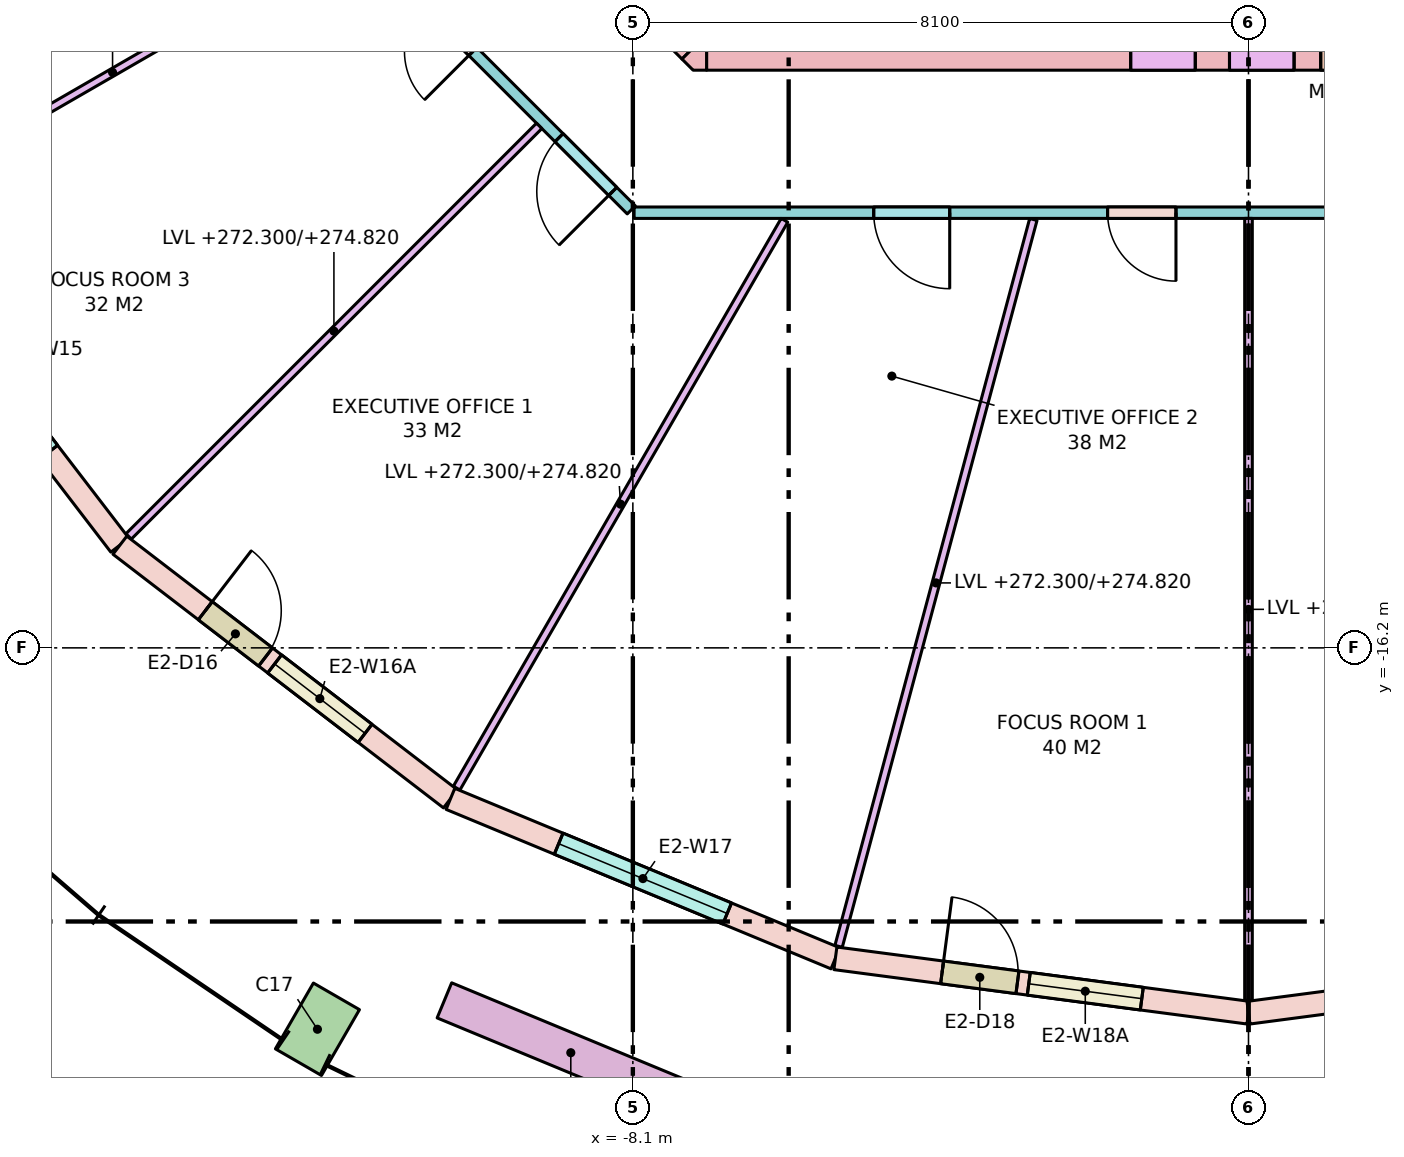
"""IFC4 building model, lengths in metres.
Left out: names, types, materials, properties, quantities, classifications, styles, units other than length and angle.
Written with IfcOpenShell. Run it as: python <this file> out.ifc"""

import sys

from ifc_helpers import new_model, si_unit, direction, frame, frame_2d, origin, origin_2d, place, context, subcontext, project, spatial, polyline, rectangle, outline, extrude, element, fill, save


model = new_model("IFC4")
c1 = context("Model", 3, precision=1e-05, world=origin(), true_north=direction((0.0, 1.0)))
c2 = subcontext(c1, "Body", "Model", "MODEL_VIEW")
j1 = project(units=[si_unit("LENGTHUNIT", "METRE"), si_unit("PLANEANGLEUNIT", "RADIAN")], contexts=[c1])
p1 = place(None, origin())
s1 = spatial("IfcSite", under=j1, at=p1, CompositionType="ELEMENT")
p2 = place(p1, origin())
s2 = spatial("IfcBuilding", under=s1, at=p2, CompositionType="ELEMENT")
p3 = place(p2, frame((0.0, 0.0, 272.3)))
s3 = spatial("IfcBuildingStorey", under=s2, at=p3, CompositionType="ELEMENT", Elevation=272.3)
p4 = place(p3, frame((-12.25, -21.218, 0.0), z_axis=(0.0, 0.0, 1.0), x_axis=(0.866025403784, -0.5, 0.0)))
e1 = element("IfcColumn", 1, at=p4, inside=s3, PredefinedType="COLUMN", context=c2, shape_type="SweptSolid", body=[
    extrude(rectangle(XDim=0.7, YDim=1.0, at=origin_2d()), origin(), (0.0, 0.0, 1.0), 3.7),
])
p5 = place(p3, frame((-7.13, -8.35, -0.28), z_axis=(0.0, 0.0, 1.0), x_axis=(1.0, 0.0, 0.0)))
e2 = element("IfcWall", 2, at=p5, inside=s3, PredefinedType="SHEAR", context=c2, shape_type="SweptSolid", body=[
    extrude(rectangle(XDim=14.26, YDim=0.5, at=frame_2d((7.13, 0.0))), origin(), (0.0, 0.0, 1.0), 3.7),
])
p6 = place(p5, frame((8.08, 0.0, 0.28)))
e3 = element("IfcOpeningElement", 3, at=p6, cuts=e2, PredefinedType="OPENING", context=c2, shape_type="SweptSolid", body=[
    extrude(rectangle(XDim=0.7, YDim=2.1, at=frame_2d((0.35, 1.05))), frame((0.0, 0.26, 0.0), z_axis=(0.0, -1.0, 0.0), x_axis=(1.0, 0.0, 0.0)), (0.0, 0.0, 1.0), 0.52),
])
p7 = place(p5, frame((5.58, 0.0, 0.28)))
e4 = element("IfcOpeningElement", 4, at=p7, cuts=e2, PredefinedType="OPENING", context=c2, shape_type="SweptSolid", body=[
    extrude(rectangle(XDim=0.85, YDim=2.1, at=frame_2d((0.425, 1.05))), frame((0.0, 0.26, 0.0), z_axis=(0.0, -1.0, 0.0), x_axis=(1.0, 0.0, 0.0)), (0.0, 0.0, 1.0), 0.52),
])
p8 = place(p5, frame((6.88, 0.0, 0.28)))
e5 = element("IfcOpeningElement", 5, at=p8, cuts=e2, PredefinedType="OPENING", context=c2, shape_type="SweptSolid", body=[
    extrude(rectangle(XDim=0.85, YDim=2.1, at=frame_2d((0.425, 1.05))), frame((0.0, 0.26, 0.0), z_axis=(0.0, -1.0, 0.0), x_axis=(1.0, 0.0, 0.0)), (0.0, 0.0, 1.0), 0.52),
])
p9 = place(p5, frame((9.445, 0.0, 0.28)))
e6 = element("IfcOpeningElement", 6, at=p9, cuts=e2, PredefinedType="OPENING", context=c2, shape_type="SweptSolid", body=[
    extrude(rectangle(XDim=0.9, YDim=2.1, at=frame_2d((0.45, 1.05))), frame((0.0, 0.26, 0.0), z_axis=(0.0, -1.0, 0.0), x_axis=(1.0, 0.0, 0.0)), (0.0, 0.0, 1.0), 0.52),
])
p10 = place(p5, frame((11.431, 0.0, 0.28)))
e7 = element("IfcOpeningElement", 7, at=p10, cuts=e2, PredefinedType="OPENING", context=c2, shape_type="SweptSolid", body=[
    extrude(rectangle(XDim=0.9, YDim=2.1, at=frame_2d((0.45, 1.05))), frame((0.0, 0.26, 0.0), z_axis=(0.0, -1.0, 0.0), x_axis=(1.0, 0.0, 0.0)), (0.0, 0.0, 1.0), 0.52),
])
p11 = place(p3, frame((-7.277, -8.277, -0.28), z_axis=(0.0, 0.0, 1.0), x_axis=(-0.707106781187, 0.707106781187, 0.0)))
e8 = element("IfcWall", 8, at=p11, inside=s3, PredefinedType="SHEAR", context=c2, shape_type="SweptSolid", body=[
    extrude(rectangle(XDim=4.243, YDim=0.5, at=frame_2d((2.121, 0.0))), origin(), (0.0, 0.0, 1.0), 3.7),
])
p12 = place(p11, frame((2.393, 0.0, 0.28)))
e9 = element("IfcOpeningElement", 9, at=p12, cuts=e8, PredefinedType="OPENING", context=c2, shape_type="SweptSolid", body=[
    extrude(rectangle(XDim=1.2, YDim=2.1, at=frame_2d((0.6, 1.05))), frame((0.0, 0.26, 0.0), z_axis=(0.0, -1.0, 0.0), x_axis=(1.0, 0.0, 0.0)), (0.0, 0.0, 1.0), 0.52),
])
p13 = place(p3, frame((0.0, 0.0, -0.28)))
e10 = element("IfcWall", 10, at=p13, inside=s3, PredefinedType="SHEAR", context=c2, shape_type="SweptSolid", body=[
    extrude(outline(polyline([(-7.307, -8.6), (-7.454, -8.454), (-7.13, -8.13), (-7.13, -8.6), (-7.307, -8.6)])), origin(), (0.0, 0.0, 1.0), 3.7),
])
p14 = place(p3, frame((-18.187, -10.5, 0.0), z_axis=(0.0, 0.0, 1.0), x_axis=(0.608784891166, -0.793335336593, 0.0)))
e11 = element("IfcWall", 11, at=p14, inside=s3, PredefinedType="STANDARD", context=c2, shape_type="SweptSolid", body=[
    extrude(rectangle(XDim=5.482, YDim=0.3, at=frame_2d((2.741, 0.0))), origin(), (0.0, 0.0, 1.0), 3.42),
])
p15 = place(p14, frame((1.541, 0.0, 0.8)))
e12 = element("IfcOpeningElement", 12, at=p15, cuts=e11, PredefinedType="OPENING", context=c2, shape_type="SweptSolid", body=[
    extrude(rectangle(XDim=2.4, YDim=2.4, at=frame_2d((1.2, 1.2))), frame((0.0, 0.16, 0.0), z_axis=(0.0, -1.0, 0.0), x_axis=(1.0, 0.0, 0.0)), (0.0, 0.0, 1.0), 0.32),
])
p16 = place(p3, frame((-14.849, -14.849, 0.0), z_axis=(0.0, 0.0, 1.0), x_axis=(0.793335336593, -0.608784891166, 0.0)))
e13 = element("IfcWall", 13, at=p16, inside=s3, PredefinedType="STANDARD", context=c2, shape_type="SweptSolid", body=[
    extrude(rectangle(XDim=5.482, YDim=0.3, at=frame_2d((2.741, 0.0))), origin(), (0.0, 0.0, 1.0), 3.42),
])
p17 = place(p16, frame((1.416, 0.0, 0.0)))
e14 = element("IfcOpeningElement", 14, at=p17, cuts=e13, PredefinedType="OPENING", context=c2, shape_type="SweptSolid", body=[
    extrude(rectangle(XDim=1.0, YDim=2.4, at=frame_2d((0.5, 1.2))), frame((0.0, 0.16, 0.0), z_axis=(0.0, -1.0, 0.0), x_axis=(1.0, 0.0, 0.0)), (0.0, 0.0, 1.0), 0.32),
])
p18 = place(p16, frame((2.566, 0.0, 0.8)))
e15 = element("IfcOpeningElement", 15, at=p18, cuts=e13, PredefinedType="OPENING", context=c2, shape_type="SweptSolid", body=[
    extrude(rectangle(XDim=1.5, YDim=2.4, at=frame_2d((0.75, 1.2))), frame((0.0, 0.16, 0.0), z_axis=(0.0, -1.0, 0.0), x_axis=(1.0, 0.0, 0.0)), (0.0, 0.0, 1.0), 0.32),
])
p19 = place(p3, frame((-10.5, -18.187, 0.0), z_axis=(0.0, 0.0, 1.0), x_axis=(0.923877333662, -0.382688740813, 0.0)))
e16 = element("IfcWall", 16, at=p19, inside=s3, PredefinedType="STANDARD", context=c2, shape_type="SweptSolid", body=[
    extrude(rectangle(XDim=5.482, YDim=0.3, at=frame_2d((2.741, 0.0))), origin(), (0.0, 0.0, 1.0), 3.42),
])
p20 = place(p19, frame((1.541, 0.0, 0.8)))
e17 = element("IfcOpeningElement", 17, at=p20, cuts=e16, PredefinedType="OPENING", context=c2, shape_type="SweptSolid", body=[
    extrude(rectangle(XDim=2.4, YDim=2.4, at=frame_2d((1.2, 1.2))), frame((0.0, 0.16, 0.0), z_axis=(0.0, -1.0, 0.0), x_axis=(1.0, 0.0, 0.0)), (0.0, 0.0, 1.0), 0.32),
])
p21 = place(p3, frame((-5.435, -20.284, 0.0), z_axis=(0.0, 0.0, 1.0), x_axis=(0.991444743541, -0.130527087244, 0.0)))
e18 = element("IfcWall", 18, at=p21, inside=s3, PredefinedType="STANDARD", context=c2, shape_type="SweptSolid", body=[
    extrude(rectangle(XDim=5.482, YDim=0.3, at=frame_2d((2.741, 0.0))), origin(), (0.0, 0.0, 1.0), 3.42),
])
p22 = place(p21, frame((1.416, 0.0, 0.0)))
e19 = element("IfcOpeningElement", 19, at=p22, cuts=e18, PredefinedType="OPENING", context=c2, shape_type="SweptSolid", body=[
    extrude(rectangle(XDim=1.0, YDim=2.4, at=frame_2d((0.5, 1.2))), frame((0.0, 0.16, 0.0), z_axis=(0.0, -1.0, 0.0), x_axis=(1.0, 0.0, 0.0)), (0.0, 0.0, 1.0), 0.32),
])
p23 = place(p21, frame((2.566, 0.0, 0.8)))
e20 = element("IfcOpeningElement", 20, at=p23, cuts=e18, PredefinedType="OPENING", context=c2, shape_type="SweptSolid", body=[
    extrude(rectangle(XDim=1.5, YDim=2.4, at=frame_2d((0.75, 1.2))), frame((0.0, 0.16, 0.0), z_axis=(0.0, -1.0, 0.0), x_axis=(1.0, 0.0, 0.0)), (0.0, 0.0, 1.0), 0.32),
])
p24 = place(p3, frame((0.0, -21.0, 0.0), z_axis=(0.0, 0.0, 1.0), x_axis=(0.991444743541, 0.130527087244, 0.0)))
e21 = element("IfcWall", 21, at=p24, inside=s3, PredefinedType="STANDARD", context=c2, shape_type="SweptSolid", body=[
    extrude(rectangle(XDim=5.482, YDim=0.3, at=frame_2d((2.741, 0.0))), origin(), (0.0, 0.0, 1.0), 3.42),
])
p25 = place(p24, frame((1.541, 0.0, 0.8)))
e22 = element("IfcOpeningElement", 22, at=p25, cuts=e21, PredefinedType="OPENING", context=c2, shape_type="SweptSolid", body=[
    extrude(rectangle(XDim=2.4, YDim=2.4, at=frame_2d((1.2, 1.2))), frame((0.0, 0.16, 0.0), z_axis=(0.0, -1.0, 0.0), x_axis=(1.0, 0.0, 0.0)), (0.0, 0.0, 1.0), 0.32),
])
p26 = place(p3, frame((-10.58, -20.838, 0.0), z_axis=(0.0, 0.0, 1.0), x_axis=(0.923909393783, -0.382611332921, 0.0)))
e23 = element("IfcWall", 23, at=p26, inside=s3, PredefinedType="PARAPET", context=c2, shape_type="SweptSolid", body=[
    extrude(rectangle(XDim=3.6, YDim=0.5, at=frame_2d((1.8, 0.0))), origin(), (0.0, 0.0, 1.0), 0.9),
])
p27 = place(p3, frame((8.084, -10.475, 0.0), z_axis=(0.0, 0.0, 1.0), x_axis=(-1.0, 0.0, 0.0)))
e24 = element("IfcWall", 24, at=p27, inside=s3, PredefinedType="PARTITIONING", context=c2, shape_type="SweptSolid", body=[
    extrude(rectangle(XDim=16.167, YDim=0.15, at=frame_2d((8.084, 0.0))), origin(), (0.0, 0.0, 1.0), 2.52),
])
p28 = place(p27, frame((12.015, 0.0, 0.0)))
e25 = element("IfcOpeningElement", 25, at=p28, cuts=e24, PredefinedType="OPENING", context=c2, shape_type="SweptSolid", body=[
    extrude(rectangle(XDim=1.0, YDim=2.1, at=frame_2d((0.5, 1.05))), frame((0.0, 0.085, 0.0), z_axis=(0.0, -1.0, 0.0), x_axis=(1.0, 0.0, 0.0)), (0.0, 0.0, 1.0), 0.17),
])
p29 = place(p27, frame((9.038, 0.0, 0.0)))
e26 = element("IfcOpeningElement", 26, at=p29, cuts=e24, PredefinedType="OPENING", context=c2, shape_type="SweptSolid", body=[
    extrude(rectangle(XDim=0.9, YDim=2.1, at=frame_2d((0.45, 1.05))), frame((0.0, 0.085, 0.0), z_axis=(0.0, -1.0, 0.0), x_axis=(1.0, 0.0, 0.0)), (0.0, 0.0, 1.0), 0.17),
])
p30 = place(p27, frame((3.167, 0.0, 0.0)))
e27 = element("IfcOpeningElement", 27, at=p30, cuts=e24, PredefinedType="OPENING", context=c2, shape_type="SweptSolid", body=[
    extrude(rectangle(XDim=1.8, YDim=2.1, at=frame_2d((0.9, 1.05))), frame((0.0, 0.085, 0.0), z_axis=(0.0, -1.0, 0.0), x_axis=(1.0, 0.0, 0.0)), (0.0, 0.0, 1.0), 0.17),
])
p31 = place(p3, frame((-8.121, -10.438, 0.0), z_axis=(0.0, 0.0, 1.0), x_axis=(-0.707106781187, 0.707106781187, 0.0)))
e28 = element("IfcWall", 28, at=p31, inside=s3, PredefinedType="PARTITIONING", context=c2, shape_type="SweptSolid", body=[
    extrude(rectangle(XDim=6.105, YDim=0.15, at=frame_2d((3.053, 0.0))), origin(), (0.0, 0.0, 1.0), 2.52),
])
p32 = place(p31, frame((0.344, 0.0, 0.0)))
e29 = element("IfcOpeningElement", 29, at=p32, cuts=e28, PredefinedType="OPENING", context=c2, shape_type="SweptSolid", body=[
    extrude(rectangle(XDim=1.0, YDim=2.1, at=frame_2d((0.5, 1.05))), frame((0.0, 0.085, 0.0), z_axis=(0.0, -1.0, 0.0), x_axis=(1.0, 0.0, 0.0)), (0.0, 0.0, 1.0), 0.17),
])
p33 = place(p31, frame((2.948, 0.0, 0.0)))
e30 = element("IfcOpeningElement", 30, at=p33, cuts=e28, PredefinedType="OPENING", context=c2, shape_type="SweptSolid", body=[
    extrude(rectangle(XDim=0.9, YDim=2.1, at=frame_2d((0.45, 1.05))), frame((0.0, 0.085, 0.0), z_axis=(0.0, -1.0, 0.0), x_axis=(1.0, 0.0, 0.0)), (0.0, 0.0, 1.0), 0.17),
])
p34 = place(p3, frame((-11.846, -6.839, 0.0), z_axis=(0.0, 0.0, 1.0), x_axis=(-0.866011787705, -0.500023583, 0.0)))
e31 = element("IfcWall", 31, at=p34, inside=s3, PredefinedType="PARTITIONING", context=c2, shape_type="SweptSolid", body=[
    extrude(rectangle(XDim=7.158, YDim=0.1, at=frame_2d((3.579, 0.0))), origin(), (0.0, 0.0, 1.0), 2.52),
])
p35 = place(p3, frame((-9.333, -9.333, 0.0), z_axis=(0.0, 0.0, 1.0), x_axis=(-0.707106781187, -0.707106781187, 0.0)))
e32 = element("IfcWall", 32, at=p35, inside=s3, PredefinedType="PARTITIONING", context=c2, shape_type="SweptSolid", body=[
    extrude(rectangle(XDim=7.639, YDim=0.1, at=frame_2d((3.819, 0.0))), origin(), (0.0, 0.0, 1.0), 2.52),
])
p36 = place(p3, frame((-6.105, -10.575, 0.0), z_axis=(0.0, 0.0, 1.0), x_axis=(-0.50001399067, -0.866017326117, 0.0)))
e33 = element("IfcWall", 33, at=p36, inside=s3, PredefinedType="PARTITIONING", context=c2, shape_type="SweptSolid", body=[
    extrude(rectangle(XDim=8.626, YDim=0.1, at=frame_2d((4.313, 0.0))), origin(), (0.0, 0.0, 1.0), 2.52),
])
p37 = place(p3, frame((-2.831, -10.564, 0.0), z_axis=(0.0, 0.0, 1.0), x_axis=(-0.258795254151, -0.965932200741, 0.0)))
e34 = element("IfcWall", 34, at=p37, inside=s3, PredefinedType="PARTITIONING", context=c2, shape_type="SweptSolid", body=[
    extrude(rectangle(XDim=9.9, YDim=0.1, at=frame_2d((4.95, 0.0))), origin(), (0.0, 0.0, 1.0), 2.52),
])
p38 = place(p3, frame((0.0, -10.55, 0.0), z_axis=(0.0, 0.0, 1.0), x_axis=(0.0, -1.0, 0.0)))
e35 = element("IfcWall", 35, at=p38, inside=s3, PredefinedType="PARTITIONING", context=c2, shape_type="SweptSolid", body=[
    extrude(rectangle(XDim=10.287, YDim=0.1, at=frame_2d((5.143, 0.0))), origin(), (0.0, 0.0, 1.0), 2.52),
])
p39 = place(p17, origin())
e36 = element("IfcDoor", 36, at=p39, inside=s3, OperationType="SINGLE_SWING_LEFT", PredefinedType="DOOR", context=c2, shape_type="SweptSolid", body=[
    extrude(rectangle(XDim=1.0, YDim=2.4, at=frame_2d((0.5, 1.2))), frame((0.0, 0.025, 0.0), z_axis=(0.0, -1.0, 0.0), x_axis=(1.0, 0.0, 0.0)), (0.0, 0.0, 1.0), 0.05),
])
fill(e14, e36)
p40 = place(p18, origin())
e37 = element("IfcWindow", 37, at=p40, inside=s3, PartitioningType="SINGLE_PANEL", PredefinedType="WINDOW", context=c2, shape_type="SweptSolid", body=[
    extrude(rectangle(XDim=1.5, YDim=2.4, at=frame_2d((0.75, 1.2))), frame((0.0, 0.03, 0.0), z_axis=(0.0, -1.0, 0.0), x_axis=(1.0, 0.0, 0.0)), (0.0, 0.0, 1.0), 0.06),
])
fill(e15, e37)
p41 = place(p20, origin())
e38 = element("IfcWindow", 38, at=p41, inside=s3, PartitioningType="SINGLE_PANEL", PredefinedType="WINDOW", context=c2, shape_type="SweptSolid", body=[
    extrude(rectangle(XDim=2.4, YDim=2.4, at=frame_2d((1.2, 1.2))), frame((0.0, 0.03, 0.0), z_axis=(0.0, -1.0, 0.0), x_axis=(1.0, 0.0, 0.0)), (0.0, 0.0, 1.0), 0.06),
])
fill(e17, e38)
p42 = place(p22, origin())
e39 = element("IfcDoor", 39, at=p42, inside=s3, OperationType="SINGLE_SWING_LEFT", PredefinedType="DOOR", context=c2, shape_type="SweptSolid", body=[
    extrude(rectangle(XDim=1.0, YDim=2.4, at=frame_2d((0.5, 1.2))), frame((0.0, 0.025, 0.0), z_axis=(0.0, -1.0, 0.0), x_axis=(1.0, 0.0, 0.0)), (0.0, 0.0, 1.0), 0.05),
])
fill(e19, e39)
p43 = place(p23, origin())
e40 = element("IfcWindow", 40, at=p43, inside=s3, PartitioningType="SINGLE_PANEL", PredefinedType="WINDOW", context=c2, shape_type="SweptSolid", body=[
    extrude(rectangle(XDim=1.5, YDim=2.4, at=frame_2d((0.75, 1.2))), frame((0.0, 0.03, 0.0), z_axis=(0.0, -1.0, 0.0), x_axis=(1.0, 0.0, 0.0)), (0.0, 0.0, 1.0), 0.06),
])
fill(e20, e40)
p44 = place(p6, origin())
e41 = element("IfcDoor", 41, at=p44, inside=s3, OperationType="SINGLE_SWING_RIGHT", PredefinedType="DOOR", context=c2, shape_type="SweptSolid", body=[
    extrude(rectangle(XDim=0.7, YDim=2.1, at=frame_2d((0.35, 1.05))), frame((0.0, 0.025, 0.0), z_axis=(0.0, -1.0, 0.0), x_axis=(1.0, 0.0, 0.0)), (0.0, 0.0, 1.0), 0.05),
])
fill(e3, e41)
p45 = place(p7, origin())
e42 = element("IfcDoor", 42, at=p45, inside=s3, OperationType="SINGLE_SWING_RIGHT", PredefinedType="DOOR", context=c2, shape_type="SweptSolid", body=[
    extrude(rectangle(XDim=0.85, YDim=2.1, at=frame_2d((0.425, 1.05))), frame((0.0, 0.025, 0.0), z_axis=(0.0, -1.0, 0.0), x_axis=(1.0, 0.0, 0.0)), (0.0, 0.0, 1.0), 0.05),
])
fill(e4, e42)
p46 = place(p8, origin())
e43 = element("IfcDoor", 43, at=p46, inside=s3, OperationType="SINGLE_SWING_LEFT", PredefinedType="DOOR", context=c2, shape_type="SweptSolid", body=[
    extrude(rectangle(XDim=0.85, YDim=2.1, at=frame_2d((0.425, 1.05))), frame((0.0, 0.025, 0.0), z_axis=(0.0, -1.0, 0.0), x_axis=(1.0, 0.0, 0.0)), (0.0, 0.0, 1.0), 0.05),
])
fill(e5, e43)
p47 = place(p32, origin())
e44 = element("IfcDoor", 44, at=p47, inside=s3, OperationType="SINGLE_SWING_LEFT", PredefinedType="DOOR", context=c2, shape_type="SweptSolid", body=[
    extrude(rectangle(XDim=1.0, YDim=2.1, at=frame_2d((0.5, 1.05))), frame((0.0, 0.025, 0.0), z_axis=(0.0, -1.0, 0.0), x_axis=(1.0, 0.0, 0.0)), (0.0, 0.0, 1.0), 0.05),
])
fill(e29, e44)
p48 = place(p28, origin())
e45 = element("IfcDoor", 45, at=p48, inside=s3, OperationType="SINGLE_SWING_LEFT", PredefinedType="DOOR", context=c2, shape_type="SweptSolid", body=[
    extrude(rectangle(XDim=1.0, YDim=2.1, at=frame_2d((0.5, 1.05))), frame((0.0, 0.025, 0.0), z_axis=(0.0, -1.0, 0.0), x_axis=(1.0, 0.0, 0.0)), (0.0, 0.0, 1.0), 0.05),
])
fill(e25, e45)
p49 = place(p29, origin())
e46 = element("IfcDoor", 46, at=p49, inside=s3, OperationType="SINGLE_SWING_LEFT", PredefinedType="DOOR", context=c2, shape_type="SweptSolid", body=[
    extrude(rectangle(XDim=0.9, YDim=2.1, at=frame_2d((0.45, 1.05))), frame((0.0, 0.025, 0.0), z_axis=(0.0, -1.0, 0.0), x_axis=(1.0, 0.0, 0.0)), (0.0, 0.0, 1.0), 0.05),
])
fill(e26, e46)
p50 = place(p33, origin())
e47 = element("IfcDoor", 47, at=p50, inside=s3, OperationType="SINGLE_SWING_LEFT", PredefinedType="DOOR", context=c2, shape_type="SweptSolid", body=[
    extrude(rectangle(XDim=0.9, YDim=2.1, at=frame_2d((0.45, 1.05))), frame((0.0, 0.025, 0.0), z_axis=(0.0, -1.0, 0.0), x_axis=(1.0, 0.0, 0.0)), (0.0, 0.0, 1.0), 0.05),
])
fill(e30, e47)
save(model, sys.argv[1])
